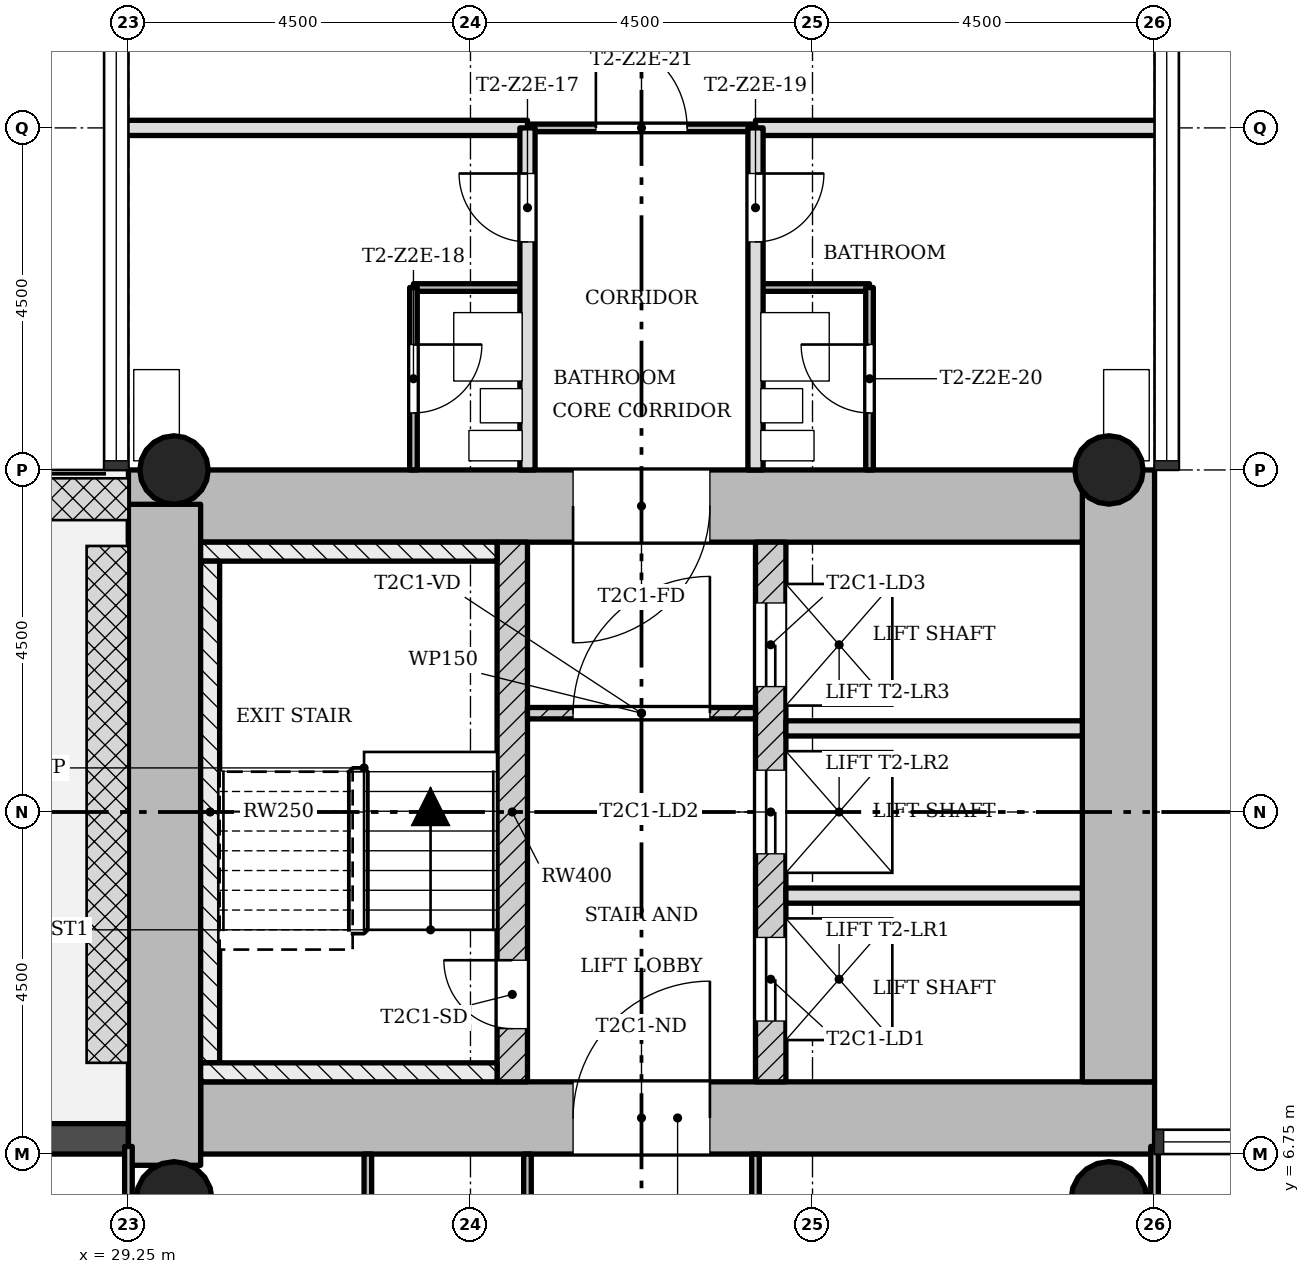
"""IFC4 building model, lengths in metres.
Left out: names, types, materials, properties, quantities, classifications, styles, units other than length and angle.
Written with IfcOpenShell. Run it as: python <this file> out.ifc"""

import sys

from ifc_helpers import new_model, si_unit, direction, frame, frame_2d, origin, origin_2d, place, context, subcontext, project, spatial, rectangle, hollow_circle, extrude, element, fill, save


model = new_model("IFC4")
c1 = context("Model", 3, precision=1e-05, world=origin(), true_north=direction((0.0, 1.0)))
c2 = subcontext(c1, "Body", "Model", "MODEL_VIEW")
j1 = project(units=[si_unit("LENGTHUNIT", "METRE"), si_unit("PLANEANGLEUNIT", "RADIAN")], contexts=[c1])
p1 = place(None, origin())
s1 = spatial("IfcSite", under=j1, at=p1, CompositionType="ELEMENT")
p2 = place(p1, origin())
s2 = spatial("IfcBuilding", under=s1, at=p2, CompositionType="ELEMENT")
p3 = place(p2, frame((0.0, 0.0, 103.8)))
s3 = spatial("IfcBuildingStorey", under=s2, at=p3, CompositionType="ELEMENT", Elevation=103.8)
p4 = place(p3, frame((30.2, 7.225, 0.0), z_axis=(0.0, 0.0, 1.0), x_axis=(1.0, 0.0, 0.0)))
e1 = element("IfcWall", 1, at=p4, inside=s3, PredefinedType="SHEAR", context=c2, shape_type="SweptSolid", body=[
    extrude(rectangle(XDim=12.55, YDim=0.95, at=frame_2d((6.275, 0.0))), origin(), (0.0, 0.0, 1.0), 3.4),
])
p5 = place(p4, frame((4.9, 0.0, 0.0)))
e2 = element("IfcOpeningElement", 2, at=p5, cuts=e1, PredefinedType="OPENING", context=c2, shape_type="SweptSolid", body=[
    extrude(rectangle(XDim=1.8, YDim=2.1, at=frame_2d((0.9, 1.05))), frame((0.0, 0.485, 0.0), z_axis=(0.0, -1.0, 0.0), x_axis=(1.0, 0.0, 0.0)), (0.0, 0.0, 1.0), 0.97),
])
p6 = place(p3, frame((42.275, 7.7, 0.0), z_axis=(0.0, 0.0, 1.0), x_axis=(0.0, 1.0, 0.0)))
e3 = element("IfcWall", 3, at=p6, inside=s3, PredefinedType="SHEAR", context=c2, shape_type="SweptSolid", body=[
    extrude(rectangle(XDim=8.05, YDim=0.95, at=frame_2d((4.025, 0.0))), origin(), (0.0, 0.0, 1.0), 3.4),
])
p7 = place(p3, frame((41.8, 15.275, 0.0), z_axis=(0.0, 0.0, 1.0), x_axis=(-1.0, 0.0, 0.0)))
e4 = element("IfcWall", 4, at=p7, inside=s3, PredefinedType="SHEAR", context=c2, shape_type="SweptSolid", body=[
    extrude(rectangle(XDim=12.55, YDim=0.95, at=frame_2d((6.275, 0.0))), origin(), (0.0, 0.0, 1.0), 3.4),
])
p8 = place(p7, frame((4.9, 0.0, 0.0)))
e5 = element("IfcOpeningElement", 5, at=p8, cuts=e4, PredefinedType="OPENING", context=c2, shape_type="SweptSolid", body=[
    extrude(rectangle(XDim=1.8, YDim=2.1, at=frame_2d((0.9, 1.05))), frame((0.0, 0.485, 0.0), z_axis=(0.0, -1.0, 0.0), x_axis=(1.0, 0.0, 0.0)), (0.0, 0.0, 1.0), 0.97),
])
p9 = place(p3, frame((29.725, 15.298, 0.0), z_axis=(0.0, 0.0, 1.0), x_axis=(0.0, -1.0, 0.0)))
e6 = element("IfcWall", 6, at=p9, inside=s3, PredefinedType="SHEAR", context=c2, shape_type="SweptSolid", body=[
    extrude(rectangle(XDim=8.696, YDim=0.95, at=frame_2d((4.348, 0.0))), origin(), (0.0, 0.0, 1.0), 3.4),
])
p10 = place(p3, frame((34.3, 7.7, 0.0), z_axis=(0.0, 0.0, 1.0), x_axis=(0.0, 1.0, 0.0)))
e7 = element("IfcWall", 7, at=p10, inside=s3, PredefinedType="SHEAR", context=c2, shape_type="SweptSolid", body=[
    extrude(rectangle(XDim=7.1, YDim=0.4, at=frame_2d((3.55, 0.0))), origin(), (0.0, 0.0, 1.0), 3.4),
])
p11 = place(p10, frame((0.7, 0.0, 0.0)))
e8 = element("IfcOpeningElement", 8, at=p11, cuts=e7, PredefinedType="OPENING", context=c2, shape_type="SweptSolid", body=[
    extrude(rectangle(XDim=0.9, YDim=2.1, at=frame_2d((0.45, 1.05))), frame((0.0, 0.21, 0.0), z_axis=(0.0, -1.0, 0.0), x_axis=(1.0, 0.0, 0.0)), (0.0, 0.0, 1.0), 0.42),
])
p12 = place(p3, frame((37.7, 7.7, 0.0), z_axis=(0.0, 0.0, 1.0), x_axis=(0.0, 1.0, 0.0)))
e9 = element("IfcWall", 9, at=p12, inside=s3, PredefinedType="SHEAR", context=c2, shape_type="SweptSolid", body=[
    extrude(rectangle(XDim=7.1, YDim=0.4, at=frame_2d((3.55, 0.0))), origin(), (0.0, 0.0, 1.0), 3.4),
])
p13 = place(p12, frame((0.8, 0.0, 0.0)))
e10 = element("IfcOpeningElement", 10, at=p13, cuts=e9, PredefinedType="OPENING", context=c2, shape_type="SweptSolid", body=[
    extrude(rectangle(XDim=1.1, YDim=2.1, at=frame_2d((0.55, 1.05))), frame((0.0, 0.21, 0.0), z_axis=(0.0, -1.0, 0.0), x_axis=(1.0, 0.0, 0.0)), (0.0, 0.0, 1.0), 0.42),
])
p14 = place(p12, frame((3.0, 0.0, 0.0)))
e11 = element("IfcOpeningElement", 11, at=p14, cuts=e9, PredefinedType="OPENING", context=c2, shape_type="SweptSolid", body=[
    extrude(rectangle(XDim=1.1, YDim=2.1, at=frame_2d((0.55, 1.05))), frame((0.0, 0.21, 0.0), z_axis=(0.0, -1.0, 0.0), x_axis=(1.0, 0.0, 0.0)), (0.0, 0.0, 1.0), 0.42),
])
p15 = place(p12, frame((5.2, 0.0, 0.0)))
e12 = element("IfcOpeningElement", 12, at=p15, cuts=e9, PredefinedType="OPENING", context=c2, shape_type="SweptSolid", body=[
    extrude(rectangle(XDim=1.1, YDim=2.1, at=frame_2d((0.55, 1.05))), frame((0.0, 0.21, 0.0), z_axis=(0.0, -1.0, 0.0), x_axis=(1.0, 0.0, 0.0)), (0.0, 0.0, 1.0), 0.42),
])
for number, where, z_axis, x_axis in (
    (13, (42.15, 15.75, 0.0), (0.0, 0.0, 1.0), (1.0, 0.0, 0.0)),
    (14, (29.85, 15.75, 0.0), (0.0, 0.0, 1.0), (1.0, 0.0, 0.0)),
):
    element("IfcColumn", number, at=place(p3, frame(where, z_axis=z_axis, x_axis=x_axis)), inside=s3, PredefinedType="COLUMN", context=c2, shape_type="SweptSolid", body=[
        extrude(hollow_circle(Radius=0.45, WallThickness=0.032, at=origin_2d()), origin(), (0.0, 0.0, 1.0), 3.4),
    ])
for number, where, z_axis, x_axis in (
    (15, (42.15, 6.15, 0.0), (0.0, 0.0, 1.0), (1.0, 0.0, 0.0)),
    (16, (29.85, 6.15, 0.0), (0.0, 0.0, 1.0), (1.0, 0.0, 0.0)),
):
    element("IfcColumn", number, at=place(p3, frame(where, z_axis=z_axis, x_axis=x_axis)), inside=s3, PredefinedType="COLUMN", context=c2, shape_type="SweptSolid", body=[
        extrude(hollow_circle(Radius=0.5, WallThickness=0.036, at=origin_2d()), origin(), (0.0, 0.0, 1.0), 3.4),
    ])
p16 = place(p3, frame((29.25, 6.95, -0.02), z_axis=(0.0, 0.0, 1.0), x_axis=(-1.0, 0.0, 0.0)))
e17 = element("IfcWall", 17, at=p16, inside=s3, PredefinedType="STANDARD", context=c2, shape_type="SweptSolid", body=[
    extrude(rectangle(XDim=4.5, YDim=0.4, at=frame_2d((2.25, 0.0))), origin(), (0.0, 0.0, 1.0), 3.12),
])
p17 = place(p16, frame((1.35, 0.0, 0.02)))
e18 = element("IfcOpeningElement", 18, at=p17, cuts=e17, PredefinedType="OPENING", context=c2, shape_type="SweptSolid", body=[
    extrude(rectangle(XDim=1.8, YDim=2.1, at=frame_2d((0.9, 1.05))), frame((0.0, 0.21, 0.0), z_axis=(0.0, -1.0, 0.0), x_axis=(1.0, 0.0, 0.0)), (0.0, 0.0, 1.0), 0.42),
])
p18 = place(p3, frame((37.5, 12.55, 0.0), z_axis=(0.0, 0.0, 1.0), x_axis=(-1.0, 0.0, 0.0)))
e19 = element("IfcWall", 19, at=p18, inside=s3, PredefinedType="PARTITIONING", context=c2, shape_type="SweptSolid", body=[
    extrude(rectangle(XDim=3.0, YDim=0.15, at=frame_2d((1.5, 0.0))), origin(), (0.0, 0.0, 1.0), 3.0),
])
p19 = place(p18, frame((0.6, 0.0, 0.0)))
e20 = element("IfcOpeningElement", 20, at=p19, cuts=e19, PredefinedType="OPENING", context=c2, shape_type="SweptSolid", body=[
    extrude(rectangle(XDim=1.8, YDim=2.1, at=frame_2d((0.9, 1.05))), frame((0.0, 0.085, 0.0), z_axis=(0.0, -1.0, 0.0), x_axis=(1.0, 0.0, 0.0)), (0.0, 0.0, 1.0), 0.17),
])
for number, where, z_axis, x_axis in (
    (21, (41.8, 10.15, 0.0), (0.0, 0.0, 1.0), (-1.0, 0.0, 0.0)),
    (22, (41.8, 12.35, 0.0), (0.0, 0.0, 1.0), (-1.0, 0.0, 0.0)),
):
    element("IfcWall", number, at=place(p3, frame(where, z_axis=z_axis, x_axis=x_axis)), inside=s3, PredefinedType="SOLIDWALL", context=c2, shape_type="SweptSolid", body=[
        extrude(rectangle(XDim=3.9, YDim=0.2, at=frame_2d((1.95, 0.0))), origin(), (0.0, 0.0, 1.0), 3.0),
    ])
for number, where, z_axis, x_axis in (
    (23, (39.0, 18.15, 0.0), (0.0, 0.0, 1.0), (-1.0, 0.0, 0.0)),
    (24, (34.5, 18.15, 0.0), (0.0, 0.0, 1.0), (-1.0, 0.0, 0.0)),
):
    element("IfcWall", number, at=place(p3, frame(where, z_axis=z_axis, x_axis=x_axis)), inside=s3, PredefinedType="PARTITIONING", context=c2, shape_type="SweptSolid", body=[
        extrude(rectangle(XDim=1.5, YDim=0.1, at=frame_2d((0.75, 0.0))), origin(), (0.0, 0.0, 1.0), 3.0),
    ])
p20 = place(p3, frame((37.5, 20.25, 0.0), z_axis=(0.0, 0.0, 1.0), x_axis=(-1.0, 0.0, 0.0)))
e25 = element("IfcWall", 25, at=p20, inside=s3, PredefinedType="PARTITIONING", context=c2, shape_type="SweptSolid", body=[
    extrude(rectangle(XDim=3.0, YDim=0.1, at=frame_2d((1.5, 0.0))), origin(), (0.0, 0.0, 1.0), 3.0),
])
p21 = place(p20, frame((0.9, 0.0, 0.0)))
e26 = element("IfcOpeningElement", 26, at=p21, cuts=e25, PredefinedType="OPENING", context=c2, shape_type="SweptSolid", body=[
    extrude(rectangle(XDim=1.2, YDim=2.1, at=frame_2d((0.6, 1.05))), frame((0.0, 0.06, 0.0), z_axis=(0.0, -1.0, 0.0), x_axis=(1.0, 0.0, 0.0)), (0.0, 0.0, 1.0), 0.12),
])
for number, where, z_axis, x_axis in (
    (27, (42.85, 20.25, 0.0), (0.0, 0.0, 1.0), (-1.0, 0.0, 0.0)),
    (28, (34.5, 20.25, 0.0), (0.0, 0.0, 1.0), (-1.0, 0.0, 0.0)),
):
    element("IfcWall", number, at=place(p3, frame(where, z_axis=z_axis, x_axis=x_axis)), inside=s3, PredefinedType="SOLIDWALL", context=c2, shape_type="SweptSolid", body=[
        extrude(rectangle(XDim=5.35, YDim=0.2, at=frame_2d((2.675, 0.0))), origin(), (0.0, 0.0, 1.0), 3.0),
    ])
p22 = place(p3, frame((42.75, 0.9, 0.0), z_axis=(0.0, 0.0, 1.0), x_axis=(0.0, 1.0, 0.0)))
e29 = element("IfcWall", 29, at=p22, inside=s3, PredefinedType="PARTITIONING", context=c2, shape_type="SweptSolid", body=[
    extrude(rectangle(XDim=5.95, YDim=0.1, at=frame_2d((2.975, 0.0))), origin(), (0.0, 0.0, 1.0), 3.0),
])
p23 = place(p3, frame((39.0, 15.75, 0.0), z_axis=(0.0, 0.0, 1.0), x_axis=(0.0, 1.0, 0.0)))
e30 = element("IfcWall", 30, at=p23, inside=s3, PredefinedType="PARTITIONING", context=c2, shape_type="SweptSolid", body=[
    extrude(rectangle(XDim=2.4, YDim=0.1, at=frame_2d((1.2, 0.0))), origin(), (0.0, 0.0, 1.0), 3.0),
])
p24 = place(p23, frame((0.75, 0.0, 0.0)))
e31 = element("IfcOpeningElement", 31, at=p24, cuts=e30, PredefinedType="OPENING", context=c2, shape_type="SweptSolid", body=[
    extrude(rectangle(XDim=0.9, YDim=2.1, at=frame_2d((0.45, 1.05))), frame((0.0, 0.06, 0.0), z_axis=(0.0, -1.0, 0.0), x_axis=(1.0, 0.0, 0.0)), (0.0, 0.0, 1.0), 0.12),
])
p25 = place(p3, frame((37.5, 0.9, 0.0), z_axis=(0.0, 0.0, 1.0), x_axis=(0.0, 1.0, 0.0)))
e32 = element("IfcWall", 32, at=p25, inside=s3, PredefinedType="PARTITIONING", context=c2, shape_type="SweptSolid", body=[
    extrude(rectangle(XDim=5.85, YDim=0.1, at=frame_2d((2.925, 0.0))), origin(), (0.0, 0.0, 1.0), 3.0),
])
p26 = place(p25, frame((4.125, 0.0, 0.0)))
e33 = element("IfcOpeningElement", 33, at=p26, cuts=e32, PredefinedType="OPENING", context=c2, shape_type="SweptSolid", body=[
    extrude(rectangle(XDim=0.9, YDim=2.1, at=frame_2d((0.45, 1.05))), frame((0.0, 0.06, 0.0), z_axis=(0.0, -1.0, 0.0), x_axis=(1.0, 0.0, 0.0)), (0.0, 0.0, 1.0), 0.12),
])
p27 = place(p3, frame((37.5, 15.75, 0.0), z_axis=(0.0, 0.0, 1.0), x_axis=(0.0, 1.0, 0.0)))
e34 = element("IfcWall", 34, at=p27, inside=s3, PredefinedType="SOLIDWALL", context=c2, shape_type="SweptSolid", body=[
    extrude(rectangle(XDim=4.5, YDim=0.2, at=frame_2d((2.25, 0.0))), origin(), (0.0, 0.0, 1.0), 3.0),
])
p28 = place(p27, frame((3.0, 0.0, 0.0)))
e35 = element("IfcOpeningElement", 35, at=p28, cuts=e34, PredefinedType="OPENING", context=c2, shape_type="SweptSolid", body=[
    extrude(rectangle(XDim=0.9, YDim=2.1, at=frame_2d((0.45, 1.05))), frame((0.0, 0.11, 0.0), z_axis=(0.0, -1.0, 0.0), x_axis=(1.0, 0.0, 0.0)), (0.0, 0.0, 1.0), 0.22),
])
p29 = place(p3, frame((34.5, 0.9, 0.0), z_axis=(0.0, 0.0, 1.0), x_axis=(0.0, 1.0, 0.0)))
e36 = element("IfcWall", 36, at=p29, inside=s3, PredefinedType="PARTITIONING", context=c2, shape_type="SweptSolid", body=[
    extrude(rectangle(XDim=5.85, YDim=0.1, at=frame_2d((2.925, 0.0))), origin(), (0.0, 0.0, 1.0), 3.0),
])
p30 = place(p29, frame((2.475, 0.0, 0.0)))
e37 = element("IfcOpeningElement", 37, at=p30, cuts=e36, PredefinedType="OPENING", context=c2, shape_type="SweptSolid", body=[
    extrude(rectangle(XDim=0.9, YDim=2.1, at=frame_2d((0.45, 1.05))), frame((0.0, 0.06, 0.0), z_axis=(0.0, -1.0, 0.0), x_axis=(1.0, 0.0, 0.0)), (0.0, 0.0, 1.0), 0.12),
])
p31 = place(p3, frame((34.5, 15.75, 0.0), z_axis=(0.0, 0.0, 1.0), x_axis=(0.0, 1.0, 0.0)))
e38 = element("IfcWall", 38, at=p31, inside=s3, PredefinedType="SOLIDWALL", context=c2, shape_type="SweptSolid", body=[
    extrude(rectangle(XDim=4.5, YDim=0.2, at=frame_2d((2.25, 0.0))), origin(), (0.0, 0.0, 1.0), 3.0),
])
p32 = place(p31, frame((3.0, 0.0, 0.0)))
e39 = element("IfcOpeningElement", 39, at=p32, cuts=e38, PredefinedType="OPENING", context=c2, shape_type="SweptSolid", body=[
    extrude(rectangle(XDim=0.9, YDim=2.1, at=frame_2d((0.45, 1.05))), frame((0.0, 0.11, 0.0), z_axis=(0.0, -1.0, 0.0), x_axis=(1.0, 0.0, 0.0)), (0.0, 0.0, 1.0), 0.22),
])
p33 = place(p3, frame((33.0, 15.75, 0.0), z_axis=(0.0, 0.0, 1.0), x_axis=(0.0, 1.0, 0.0)))
e40 = element("IfcWall", 40, at=p33, inside=s3, PredefinedType="PARTITIONING", context=c2, shape_type="SweptSolid", body=[
    extrude(rectangle(XDim=2.4, YDim=0.1, at=frame_2d((1.2, 0.0))), origin(), (0.0, 0.0, 1.0), 3.0),
])
p34 = place(p33, frame((0.75, 0.0, 0.0)))
e41 = element("IfcOpeningElement", 41, at=p34, cuts=e40, PredefinedType="OPENING", context=c2, shape_type="SweptSolid", body=[
    extrude(rectangle(XDim=0.9, YDim=2.1, at=frame_2d((0.45, 1.05))), frame((0.0, 0.06, 0.0), z_axis=(0.0, -1.0, 0.0), x_axis=(1.0, 0.0, 0.0)), (0.0, 0.0, 1.0), 0.12),
])
p35 = place(p3, frame((32.4, 0.9, 0.0), z_axis=(0.0, 0.0, 1.0), x_axis=(0.0, 1.0, 0.0)))
e42 = element("IfcWall", 42, at=p35, inside=s3, PredefinedType="PARTITIONING", context=c2, shape_type="SweptSolid", body=[
    extrude(rectangle(XDim=5.85, YDim=0.1, at=frame_2d((2.925, 0.0))), origin(), (0.0, 0.0, 1.0), 3.0),
])
p36 = place(p3, frame((29.25, 0.9, 0.0), z_axis=(0.0, 0.0, 1.0), x_axis=(0.0, 1.0, 0.0)))
e43 = element("IfcWall", 43, at=p36, inside=s3, PredefinedType="PARTITIONING", context=c2, shape_type="SweptSolid", body=[
    extrude(rectangle(XDim=5.95, YDim=0.1, at=frame_2d((2.975, 0.0))), origin(), (0.0, 0.0, 1.0), 3.0),
])
p37 = place(p3, frame((34.1, 14.675, 0.0), z_axis=(0.0, 0.0, 1.0), x_axis=(-1.0, 0.0, 0.0)))
e44 = element("IfcWall", 44, at=p37, inside=s3, PredefinedType="SHEAR", context=c2, shape_type="SweptSolid", body=[
    extrude(rectangle(XDim=3.9, YDim=0.25, at=frame_2d((1.95, 0.0))), origin(), (0.0, 0.0, 1.0), 3.4),
])
p38 = place(p3, frame((30.325, 7.95, 0.0), z_axis=(0.0, 0.0, 1.0), x_axis=(0.0, 1.0, 0.0)))
e45 = element("IfcWall", 45, at=p38, inside=s3, PredefinedType="SHEAR", context=c2, shape_type="SweptSolid", body=[
    extrude(rectangle(XDim=6.6, YDim=0.25, at=frame_2d((3.3, 0.0))), origin(), (0.0, 0.0, 1.0), 3.4),
])
p39 = place(p3, frame((34.1, 7.825, 0.0), z_axis=(0.0, 0.0, 1.0), x_axis=(-1.0, 0.0, 0.0)))
e46 = element("IfcWall", 46, at=p39, inside=s3, PredefinedType="SHEAR", context=c2, shape_type="SweptSolid", body=[
    extrude(rectangle(XDim=3.9, YDim=0.25, at=frame_2d((1.95, 0.0))), origin(), (0.0, 0.0, 1.0), 3.4),
])
p40 = place(p19, origin())
e47 = element("IfcDoor", 47, at=p40, inside=s3, OperationType="SINGLE_SWING_LEFT", PredefinedType="DOOR", context=c2, shape_type="SweptSolid", body=[
    extrude(rectangle(XDim=1.8, YDim=2.1, at=frame_2d((0.9, 1.05))), frame((0.0, 0.025, 0.0), z_axis=(0.0, -1.0, 0.0), x_axis=(1.0, 0.0, 0.0)), (0.0, 0.0, 1.0), 0.05),
])
fill(e20, e47)
p41 = place(p32, origin())
e48 = element("IfcDoor", 48, at=p41, inside=s3, OperationType="SINGLE_SWING_LEFT", PredefinedType="DOOR", context=c2, shape_type="SweptSolid", body=[
    extrude(rectangle(XDim=0.9, YDim=2.1, at=frame_2d((0.45, 1.05))), frame((0.0, 0.025, 0.0), z_axis=(0.0, -1.0, 0.0), x_axis=(1.0, 0.0, 0.0)), (0.0, 0.0, 1.0), 0.05),
])
fill(e39, e48)
p42 = place(p34, origin())
e49 = element("IfcDoor", 49, at=p42, inside=s3, OperationType="SINGLE_SWING_RIGHT", PredefinedType="DOOR", context=c2, shape_type="SweptSolid", body=[
    extrude(rectangle(XDim=0.9, YDim=2.1, at=frame_2d((0.45, 1.05))), frame((0.0, 0.025, 0.0), z_axis=(0.0, -1.0, 0.0), x_axis=(1.0, 0.0, 0.0)), (0.0, 0.0, 1.0), 0.05),
])
fill(e41, e49)
p43 = place(p28, origin())
e50 = element("IfcDoor", 50, at=p43, inside=s3, OperationType="SINGLE_SWING_RIGHT", PredefinedType="DOOR", context=c2, shape_type="SweptSolid", body=[
    extrude(rectangle(XDim=0.9, YDim=2.1, at=frame_2d((0.45, 1.05))), frame((0.0, 0.025, 0.0), z_axis=(0.0, -1.0, 0.0), x_axis=(1.0, 0.0, 0.0)), (0.0, 0.0, 1.0), 0.05),
])
fill(e35, e50)
p44 = place(p24, origin())
e51 = element("IfcDoor", 51, at=p44, inside=s3, OperationType="SINGLE_SWING_LEFT", PredefinedType="DOOR", context=c2, shape_type="SweptSolid", body=[
    extrude(rectangle(XDim=0.9, YDim=2.1, at=frame_2d((0.45, 1.05))), frame((0.0, 0.025, 0.0), z_axis=(0.0, -1.0, 0.0), x_axis=(1.0, 0.0, 0.0)), (0.0, 0.0, 1.0), 0.05),
])
fill(e31, e51)
p45 = place(p21, origin())
e52 = element("IfcDoor", 52, at=p45, inside=s3, OperationType="SINGLE_SWING_RIGHT", PredefinedType="DOOR", context=c2, shape_type="SweptSolid", body=[
    extrude(rectangle(XDim=1.2, YDim=2.1, at=frame_2d((0.6, 1.05))), frame((0.0, 0.025, 0.0), z_axis=(0.0, -1.0, 0.0), x_axis=(1.0, 0.0, 0.0)), (0.0, 0.0, 1.0), 0.05),
])
fill(e26, e52)
p46 = place(p11, origin())
e53 = element("IfcDoor", 53, at=p46, inside=s3, OperationType="SINGLE_SWING_LEFT", PredefinedType="DOOR", context=c2, shape_type="SweptSolid", body=[
    extrude(rectangle(XDim=0.9, YDim=2.1, at=frame_2d((0.45, 1.05))), frame((0.0, 0.025, 0.0), z_axis=(0.0, -1.0, 0.0), x_axis=(1.0, 0.0, 0.0)), (0.0, 0.0, 1.0), 0.05),
])
fill(e8, e53)
p47 = place(p13, origin())
e54 = element("IfcDoor", 54, at=p47, inside=s3, OperationType="SLIDING_TO_LEFT", PredefinedType="DOOR", context=c2, shape_type="SweptSolid", body=[
    extrude(rectangle(XDim=1.1, YDim=2.1, at=frame_2d((0.55, 1.05))), frame((0.0, 0.025, 0.0), z_axis=(0.0, -1.0, 0.0), x_axis=(1.0, 0.0, 0.0)), (0.0, 0.0, 1.0), 0.05),
])
fill(e10, e54)
p48 = place(p14, origin())
e55 = element("IfcDoor", 55, at=p48, inside=s3, OperationType="SLIDING_TO_LEFT", PredefinedType="DOOR", context=c2, shape_type="SweptSolid", body=[
    extrude(rectangle(XDim=1.1, YDim=2.1, at=frame_2d((0.55, 1.05))), frame((0.0, 0.025, 0.0), z_axis=(0.0, -1.0, 0.0), x_axis=(1.0, 0.0, 0.0)), (0.0, 0.0, 1.0), 0.05),
])
fill(e11, e55)
p49 = place(p15, origin())
e56 = element("IfcDoor", 56, at=p49, inside=s3, OperationType="SLIDING_TO_LEFT", PredefinedType="DOOR", context=c2, shape_type="SweptSolid", body=[
    extrude(rectangle(XDim=1.1, YDim=2.1, at=frame_2d((0.55, 1.05))), frame((0.0, 0.025, 0.0), z_axis=(0.0, -1.0, 0.0), x_axis=(1.0, 0.0, 0.0)), (0.0, 0.0, 1.0), 0.05),
])
fill(e12, e56)
p50 = place(p5, origin())
e57 = element("IfcDoor", 57, at=p50, inside=s3, OperationType="SINGLE_SWING_LEFT", PredefinedType="DOOR", context=c2, shape_type="SweptSolid", body=[
    extrude(rectangle(XDim=1.8, YDim=2.1, at=frame_2d((0.9, 1.05))), frame((0.0, 0.025, 0.0), z_axis=(0.0, -1.0, 0.0), x_axis=(1.0, 0.0, 0.0)), (0.0, 0.0, 1.0), 0.05),
])
fill(e2, e57)
p51 = place(p8, origin())
e58 = element("IfcDoor", 58, at=p51, inside=s3, OperationType="SINGLE_SWING_LEFT", PredefinedType="DOOR", context=c2, shape_type="SweptSolid", body=[
    extrude(rectangle(XDim=1.8, YDim=2.1, at=frame_2d((0.9, 1.05))), frame((0.0, 0.025, 0.0), z_axis=(0.0, -1.0, 0.0), x_axis=(1.0, 0.0, 0.0)), (0.0, 0.0, 1.0), 0.05),
])
fill(e5, e58)
save(model, sys.argv[1])
